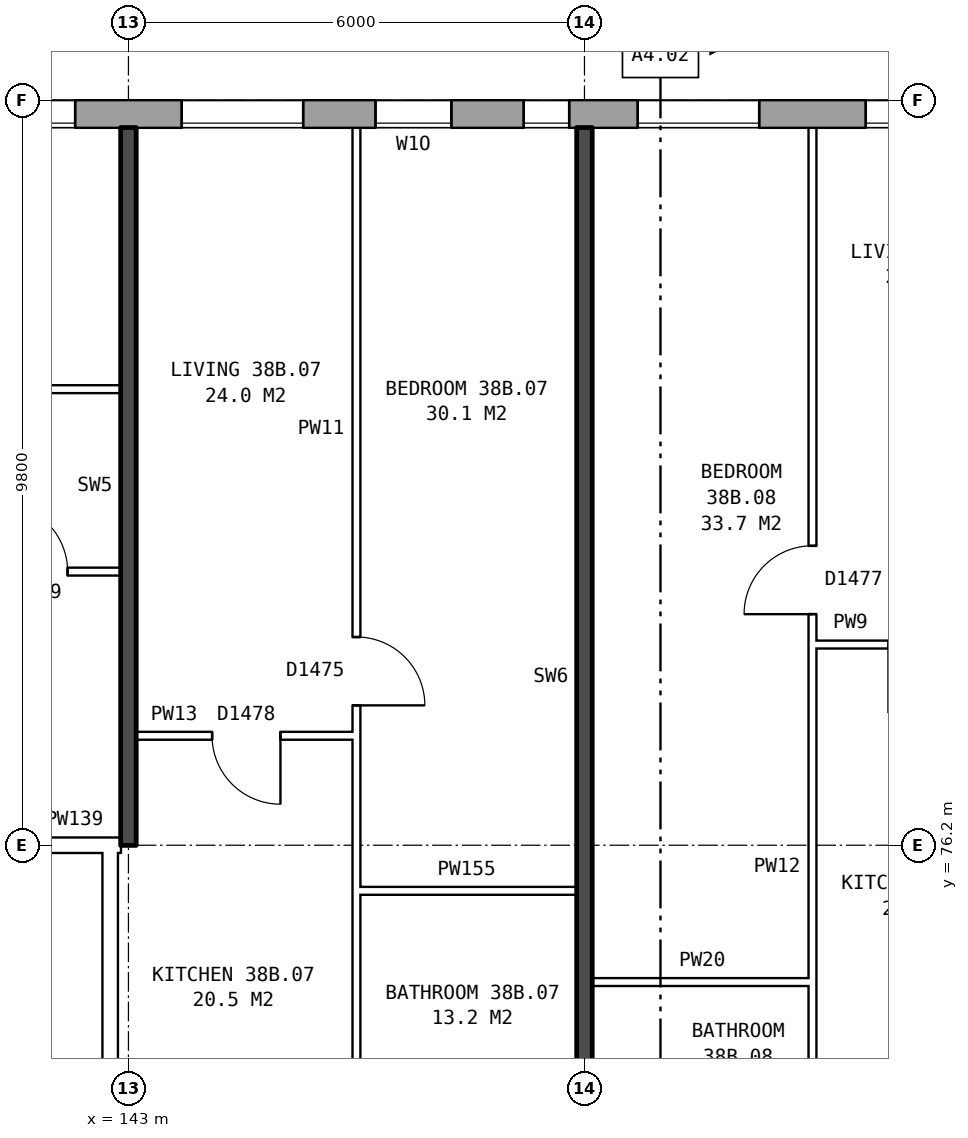
"""IFC4 building model, lengths in metres.
Left out: names, types, materials, properties, quantities, classifications, styles, units other than length and angle.
Written with IfcOpenShell. Run it as: python <this file> out.ifc"""

import sys

from ifc_helpers import new_model, si_unit, direction, frame, frame_2d, origin, place, context, subcontext, project, spatial, rectangle, extrude, element, fill, save


model = new_model("IFC4")
c1 = context("Model", 3, precision=1e-05, world=origin(), true_north=direction((0.0, 1.0)))
c2 = subcontext(c1, "Body", "Model", "MODEL_VIEW")
j1 = project(units=[si_unit("LENGTHUNIT", "METRE"), si_unit("PLANEANGLEUNIT", "RADIAN")], contexts=[c1])
p1 = place(None, origin())
s1 = spatial("IfcSite", under=j1, at=p1, CompositionType="ELEMENT")
p2 = place(p1, origin())
s2 = spatial("IfcBuilding", under=s1, at=p2, CompositionType="ELEMENT")
p3 = place(p2, frame((0.0, 0.0, 136.1)))
s3 = spatial("IfcBuildingStorey", under=s2, at=p3, CompositionType="ELEMENT", Elevation=136.1)
p4 = place(p3, frame((169.675, 85.82, 0.0), z_axis=(0.0, 0.0, 1.0), x_axis=(-1.0, 0.0, 0.0)))
e1 = element("IfcWall", 1, at=p4, inside=s3, PredefinedType="STANDARD", context=c2, shape_type="SweptSolid", body=[
    extrude(rectangle(XDim=35.601, YDim=0.36, at=frame_2d((17.8, 0.0))), origin(), (0.0, 0.0, 1.0), 2.85),
])
p5 = place(p4, frame((0.375, 0.0, 0.8)))
e2 = element("IfcOpeningElement", 2, at=p5, cuts=e1, PredefinedType="OPENING", context=c2, shape_type="SweptSolid", body=[
    extrude(rectangle(XDim=1.6, YDim=1.8, at=frame_2d((0.8, 0.9))), frame((0.0, 0.19, 0.0), z_axis=(0.0, -1.0, 0.0), x_axis=(1.0, 0.0, 0.0)), (0.0, 0.0, 1.0), 0.38),
])
p6 = place(p4, frame((3.375, 0.0, 0.8)))
e3 = element("IfcOpeningElement", 3, at=p6, cuts=e1, PredefinedType="OPENING", context=c2, shape_type="SweptSolid", body=[
    extrude(rectangle(XDim=1.6, YDim=1.8, at=frame_2d((0.8, 0.9))), frame((0.0, 0.19, 0.0), z_axis=(0.0, -1.0, 0.0), x_axis=(1.0, 0.0, 0.0)), (0.0, 0.0, 1.0), 0.38),
])
p7 = place(p4, frame((6.375, 0.0, 0.8)))
e4 = element("IfcOpeningElement", 4, at=p7, cuts=e1, PredefinedType="OPENING", context=c2, shape_type="SweptSolid", body=[
    extrude(rectangle(XDim=1.6, YDim=1.8, at=frame_2d((0.8, 0.9))), frame((0.0, 0.19, 0.0), z_axis=(0.0, -1.0, 0.0), x_axis=(1.0, 0.0, 0.0)), (0.0, 0.0, 1.0), 0.38),
])
p8 = place(p4, frame((9.375, 0.0, 0.8)))
e5 = element("IfcOpeningElement", 5, at=p8, cuts=e1, PredefinedType="OPENING", context=c2, shape_type="SweptSolid", body=[
    extrude(rectangle(XDim=1.6, YDim=1.8, at=frame_2d((0.8, 0.9))), frame((0.0, 0.19, 0.0), z_axis=(0.0, -1.0, 0.0), x_axis=(1.0, 0.0, 0.0)), (0.0, 0.0, 1.0), 0.38),
])
p9 = place(p4, frame((11.275, 0.0, 0.8)))
e6 = element("IfcOpeningElement", 6, at=p9, cuts=e1, PredefinedType="OPENING", context=c2, shape_type="SweptSolid", body=[
    extrude(rectangle(XDim=1.2, YDim=1.8, at=frame_2d((0.6, 0.9))), frame((0.0, 0.19, 0.0), z_axis=(0.0, -1.0, 0.0), x_axis=(1.0, 0.0, 0.0)), (0.0, 0.0, 1.0), 0.38),
])
p10 = place(p4, frame((15.375, 0.0, 0.8)))
e7 = element("IfcOpeningElement", 7, at=p10, cuts=e1, PredefinedType="OPENING", context=c2, shape_type="SweptSolid", body=[
    extrude(rectangle(XDim=1.6, YDim=1.8, at=frame_2d((0.8, 0.9))), frame((0.0, 0.19, 0.0), z_axis=(0.0, -1.0, 0.0), x_axis=(1.0, 0.0, 0.0)), (0.0, 0.0, 1.0), 0.38),
])
p11 = place(p4, frame((18.375, 0.0, 0.8)))
e8 = element("IfcOpeningElement", 8, at=p11, cuts=e1, PredefinedType="OPENING", context=c2, shape_type="SweptSolid", body=[
    extrude(rectangle(XDim=1.6, YDim=1.8, at=frame_2d((0.8, 0.9))), frame((0.0, 0.19, 0.0), z_axis=(0.0, -1.0, 0.0), x_axis=(1.0, 0.0, 0.0)), (0.0, 0.0, 1.0), 0.38),
])
p12 = place(p4, frame((20.875, 0.0, 0.35)))
e9 = element("IfcOpeningElement", 9, at=p12, cuts=e1, PredefinedType="OPENING", context=c2, shape_type="SweptSolid", body=[
    extrude(rectangle(XDim=0.6, YDim=0.9, at=frame_2d((0.3, 0.45))), frame((0.0, 0.19, 0.0), z_axis=(0.0, -1.0, 0.0), x_axis=(1.0, 0.0, 0.0)), (0.0, 0.0, 1.0), 0.38),
])
p13 = place(p4, frame((24.375, 0.0, 0.8)))
e10 = element("IfcOpeningElement", 10, at=p13, cuts=e1, PredefinedType="OPENING", context=c2, shape_type="SweptSolid", body=[
    extrude(rectangle(XDim=1.6, YDim=1.8, at=frame_2d((0.8, 0.9))), frame((0.0, 0.19, 0.0), z_axis=(0.0, -1.0, 0.0), x_axis=(1.0, 0.0, 0.0)), (0.0, 0.0, 1.0), 0.38),
])
p14 = place(p4, frame((27.375, 0.0, 0.8)))
e11 = element("IfcOpeningElement", 11, at=p14, cuts=e1, PredefinedType="OPENING", context=c2, shape_type="SweptSolid", body=[
    extrude(rectangle(XDim=1.6, YDim=1.8, at=frame_2d((0.8, 0.9))), frame((0.0, 0.19, 0.0), z_axis=(0.0, -1.0, 0.0), x_axis=(1.0, 0.0, 0.0)), (0.0, 0.0, 1.0), 0.38),
])
p15 = place(p4, frame((30.375, 0.0, 0.8)))
e12 = element("IfcOpeningElement", 12, at=p15, cuts=e1, PredefinedType="OPENING", context=c2, shape_type="SweptSolid", body=[
    extrude(rectangle(XDim=1.6, YDim=1.8, at=frame_2d((0.8, 0.9))), frame((0.0, 0.19, 0.0), z_axis=(0.0, -1.0, 0.0), x_axis=(1.0, 0.0, 0.0)), (0.0, 0.0, 1.0), 0.38),
])
p16 = place(p4, frame((33.375, 0.0, 0.8)))
e13 = element("IfcOpeningElement", 13, at=p16, cuts=e1, PredefinedType="OPENING", context=c2, shape_type="SweptSolid", body=[
    extrude(rectangle(XDim=1.6, YDim=1.8, at=frame_2d((0.8, 0.9))), frame((0.0, 0.19, 0.0), z_axis=(0.0, -1.0, 0.0), x_axis=(1.0, 0.0, 0.0)), (0.0, 0.0, 1.0), 0.38),
])
p17 = place(p4, frame((12.775, 0.0, 1.6)))
e14 = element("IfcOpeningElement", 14, at=p17, cuts=e1, PredefinedType="OPENING", context=c2, shape_type="SweptSolid", body=[
    extrude(rectangle(XDim=0.6, YDim=0.9, at=frame_2d((0.3, 0.45))), frame((0.0, 0.19, 0.0), z_axis=(0.0, -1.0, 0.0), x_axis=(1.0, 0.0, 0.0)), (0.0, 0.0, 1.0), 0.38),
])
p18 = place(p4, frame((22.425, 0.0, 1.35)))
e15 = element("IfcOpeningElement", 15, at=p18, cuts=e1, PredefinedType="OPENING", context=c2, shape_type="SweptSolid", body=[
    extrude(rectangle(XDim=1.0, YDim=1.2, at=frame_2d((0.5, 0.6))), frame((0.0, 0.19, 0.0), z_axis=(0.0, -1.0, 0.0), x_axis=(1.0, 0.0, 0.0)), (0.0, 0.0, 1.0), 0.38),
])
p19 = place(p3, frame((142.76, 63.9, 0.0), z_axis=(0.0, 0.0, 1.0), x_axis=(0.0, 1.0, 0.0)))
e16 = element("IfcWall", 16, at=p19, inside=s3, PredefinedType="PARTITIONING", context=c2, shape_type="SweptSolid", body=[
    extrude(rectangle(XDim=12.2, YDim=0.2, at=frame_2d((6.1, 0.0))), origin(), (0.0, 0.0, 1.0), 2.85),
])
p20 = place(p19, frame((5.1, 0.0, 0.0)))
e17 = element("IfcOpeningElement", 17, at=p20, cuts=e16, PredefinedType="OPENING", context=c2, shape_type="SweptSolid", body=[
    extrude(rectangle(XDim=2.0, YDim=2.1, at=frame_2d((1.0, 1.05))), frame((0.0, 0.11, 0.0), z_axis=(0.0, -1.0, 0.0), x_axis=(1.0, 0.0, 0.0)), (0.0, 0.0, 1.0), 0.22),
])
for number, where, z_axis, x_axis in (
    (18, (149.1, 74.4, 0.0), (0.0, 0.0, 1.0), (1.0, 0.0, 0.0)),
    (19, (146.0, 75.6, 0.0), (0.0, 0.0, 1.0), (1.0, 0.0, 0.0)),
):
    element("IfcWall", number, at=place(p3, frame(where, z_axis=z_axis, x_axis=x_axis)), inside=s3, PredefinedType="PARTITIONING", context=c2, shape_type="SweptSolid", body=[
        extrude(rectangle(XDim=2.9, YDim=0.1, at=frame_2d((1.45, 0.0))), origin(), (0.0, 0.0, 1.0), 2.85),
    ])
p21 = place(p3, frame((139.76, 76.2, 0.0), z_axis=(0.0, 0.0, 1.0), x_axis=(1.0, 0.0, 0.0)))
e20 = element("IfcWall", 20, at=p21, inside=s3, PredefinedType="PARTITIONING", context=c2, shape_type="SweptSolid", body=[
    extrude(rectangle(XDim=3.0, YDim=0.2, at=frame_2d((1.5, 0.0))), origin(), (0.0, 0.0, 1.0), 2.85),
])
p22 = place(p21, frame((1.0, 0.0, 0.0)))
e21 = element("IfcOpeningElement", 21, at=p22, cuts=e20, PredefinedType="OPENING", context=c2, shape_type="SweptSolid", body=[
    extrude(rectangle(XDim=1.0, YDim=2.1, at=frame_2d((0.5, 1.05))), frame((0.0, 0.11, 0.0), z_axis=(0.0, -1.0, 0.0), x_axis=(1.0, 0.0, 0.0)), (0.0, 0.0, 1.0), 0.22),
])
p23 = place(p3, frame((142.76, 76.2, 0.0), z_axis=(0.0, 0.0, 1.0), x_axis=(1.0, 0.0, 0.0)))
e22 = element("IfcWall", 22, at=p23, inside=s3, PredefinedType="PARTITIONING", context=c2, shape_type="SweptSolid", body=[
    extrude(rectangle(XDim=0.14, YDim=0.2, at=frame_2d((0.07, 0.0))), origin(), (0.0, 0.0, 1.0), 2.85),
])
p24 = place(p3, frame((143.1, 77.64, 0.0), z_axis=(0.0, 0.0, 1.0), x_axis=(1.0, 0.0, 0.0)))
e23 = element("IfcWall", 23, at=p24, inside=s3, PredefinedType="PARTITIONING", context=c2, shape_type="SweptSolid", body=[
    extrude(rectangle(XDim=2.9, YDim=0.1, at=frame_2d((1.45, 0.0))), origin(), (0.0, 0.0, 1.0), 2.85),
])
p25 = place(p24, frame((1.0, 0.0, 0.0)))
e24 = element("IfcOpeningElement", 24, at=p25, cuts=e23, PredefinedType="OPENING", context=c2, shape_type="SweptSolid", body=[
    extrude(rectangle(XDim=0.9, YDim=2.1, at=frame_2d((0.45, 1.05))), frame((0.0, 0.06, 0.0), z_axis=(0.0, -1.0, 0.0), x_axis=(1.0, 0.0, 0.0)), (0.0, 0.0, 1.0), 0.12),
])
p26 = place(p3, frame((152.0, 78.84, 0.0), z_axis=(0.0, 0.0, 1.0), x_axis=(1.0, 0.0, 0.0)))
e25 = element("IfcWall", 25, at=p26, inside=s3, PredefinedType="PARTITIONING", context=c2, shape_type="SweptSolid", body=[
    extrude(rectangle(XDim=2.9, YDim=0.1, at=frame_2d((1.45, 0.0))), origin(), (0.0, 0.0, 1.0), 2.85),
])
p27 = place(p26, frame((1.0, 0.0, 0.0)))
e26 = element("IfcOpeningElement", 26, at=p27, cuts=e25, PredefinedType="OPENING", context=c2, shape_type="SweptSolid", body=[
    extrude(rectangle(XDim=0.9, YDim=2.1, at=frame_2d((0.45, 1.05))), frame((0.0, 0.06, 0.0), z_axis=(0.0, -1.0, 0.0), x_axis=(1.0, 0.0, 0.0)), (0.0, 0.0, 1.0), 0.12),
])
p28 = place(p3, frame((137.1, 79.8, 0.0), z_axis=(0.0, 0.0, 1.0), x_axis=(1.0, 0.0, 0.0)))
e27 = element("IfcWall", 27, at=p28, inside=s3, PredefinedType="PARTITIONING", context=c2, shape_type="SweptSolid", body=[
    extrude(rectangle(XDim=5.8, YDim=0.1, at=frame_2d((2.9, 0.0))), origin(), (0.0, 0.0, 1.0), 2.85),
])
p29 = place(p28, frame((1.3, 0.0, 0.0)))
e28 = element("IfcOpeningElement", 28, at=p29, cuts=e27, PredefinedType="OPENING", context=c2, shape_type="SweptSolid", body=[
    extrude(rectangle(XDim=0.9, YDim=2.1, at=frame_2d((0.45, 1.05))), frame((0.0, 0.06, 0.0), z_axis=(0.0, -1.0, 0.0), x_axis=(1.0, 0.0, 0.0)), (0.0, 0.0, 1.0), 0.12),
])
p30 = place(p28, frame((4.2, 0.0, 0.0)))
e29 = element("IfcOpeningElement", 29, at=p30, cuts=e27, PredefinedType="OPENING", context=c2, shape_type="SweptSolid", body=[
    extrude(rectangle(XDim=0.9, YDim=2.1, at=frame_2d((0.45, 1.05))), frame((0.0, 0.06, 0.0), z_axis=(0.0, -1.0, 0.0), x_axis=(1.0, 0.0, 0.0)), (0.0, 0.0, 1.0), 0.12),
])
p31 = place(p3, frame((140.6, 82.2, 0.0), z_axis=(0.0, 0.0, 1.0), x_axis=(1.0, 0.0, 0.0)))
e30 = element("IfcWall", 30, at=p31, inside=s3, PredefinedType="PARTITIONING", context=c2, shape_type="SweptSolid", body=[
    extrude(rectangle(XDim=2.3, YDim=0.1, at=frame_2d((1.15, 0.0))), origin(), (0.0, 0.0, 1.0), 2.85),
])
p32 = place(p3, frame((143.0, 76.2, 0.0), z_axis=(0.0, 0.0, 1.0), x_axis=(0.0, 1.0, 0.0)))
e31 = element("IfcWall", 31, at=p32, inside=s3, PredefinedType="SOLIDWALL", context=c2, shape_type="SweptSolid", body=[
    extrude(rectangle(XDim=9.44, YDim=0.2, at=frame_2d((4.72, 0.0))), origin(), (0.0, 0.0, 1.0), 2.85),
])
p33 = place(p3, frame((146.0, 71.3, 0.0), z_axis=(0.0, 0.0, 1.0), x_axis=(0.0, 1.0, 0.0)))
e32 = element("IfcWall", 32, at=p33, inside=s3, PredefinedType="PARTITIONING", context=c2, shape_type="SweptSolid", body=[
    extrude(rectangle(XDim=14.34, YDim=0.1, at=frame_2d((7.17, 0.0))), origin(), (0.0, 0.0, 1.0), 2.85),
])
p34 = place(p33, frame((6.74, 0.0, 0.0)))
e33 = element("IfcOpeningElement", 33, at=p34, cuts=e32, PredefinedType="OPENING", context=c2, shape_type="SweptSolid", body=[
    extrude(rectangle(XDim=0.9, YDim=2.1, at=frame_2d((0.45, 1.05))), frame((0.0, 0.06, 0.0), z_axis=(0.0, -1.0, 0.0), x_axis=(1.0, 0.0, 0.0)), (0.0, 0.0, 1.0), 0.12),
])
p35 = place(p33, frame((0.4, 0.0, 0.0)))
e34 = element("IfcOpeningElement", 34, at=p35, cuts=e32, PredefinedType="OPENING", context=c2, shape_type="SweptSolid", body=[
    extrude(rectangle(XDim=0.9, YDim=2.1, at=frame_2d((0.45, 1.05))), frame((0.0, 0.06, 0.0), z_axis=(0.0, -1.0, 0.0), x_axis=(1.0, 0.0, 0.0)), (0.0, 0.0, 1.0), 0.12),
])
p36 = place(p3, frame((149.0, 71.2, 0.0), z_axis=(0.0, 0.0, 1.0), x_axis=(0.0, 1.0, 0.0)))
e35 = element("IfcWall", 35, at=p36, inside=s3, PredefinedType="SOLIDWALL", context=c2, shape_type="SweptSolid", body=[
    extrude(rectangle(XDim=14.44, YDim=0.2, at=frame_2d((7.22, 0.0))), origin(), (0.0, 0.0, 1.0), 2.85),
])
p37 = place(p3, frame((152.0, 71.3, 0.0), z_axis=(0.0, 0.0, 1.0), x_axis=(0.0, 1.0, 0.0)))
e36 = element("IfcWall", 36, at=p37, inside=s3, PredefinedType="PARTITIONING", context=c2, shape_type="SweptSolid", body=[
    extrude(rectangle(XDim=14.34, YDim=0.1, at=frame_2d((7.17, 0.0))), origin(), (0.0, 0.0, 1.0), 2.85),
])
p38 = place(p37, frame((7.94, 0.0, 0.0)))
e37 = element("IfcOpeningElement", 37, at=p38, cuts=e36, PredefinedType="OPENING", context=c2, shape_type="SweptSolid", body=[
    extrude(rectangle(XDim=0.9, YDim=2.1, at=frame_2d((0.45, 1.05))), frame((0.0, 0.06, 0.0), z_axis=(0.0, -1.0, 0.0), x_axis=(1.0, 0.0, 0.0)), (0.0, 0.0, 1.0), 0.12),
])
p39 = place(p37, frame((0.4, 0.0, 0.0)))
e38 = element("IfcOpeningElement", 38, at=p39, cuts=e36, PredefinedType="OPENING", context=c2, shape_type="SweptSolid", body=[
    extrude(rectangle(XDim=0.9, YDim=2.1, at=frame_2d((0.45, 1.05))), frame((0.0, 0.06, 0.0), z_axis=(0.0, -1.0, 0.0), x_axis=(1.0, 0.0, 0.0)), (0.0, 0.0, 1.0), 0.12),
])
p40 = place(p10, origin())
e39 = element("IfcWindow", 39, at=p40, inside=s3, PartitioningType="SINGLE_PANEL", PredefinedType="WINDOW", context=c2, shape_type="SweptSolid", body=[
    extrude(rectangle(XDim=1.6, YDim=1.8, at=frame_2d((0.8, 0.9))), frame((0.0, 0.15, 0.0), z_axis=(0.0, -1.0, 0.0), x_axis=(1.0, 0.0, 0.0)), (0.0, 0.0, 1.0), 0.06),
])
fill(e7, e39)
p41 = place(p11, origin())
e40 = element("IfcWindow", 40, at=p41, inside=s3, PartitioningType="SINGLE_PANEL", PredefinedType="WINDOW", context=c2, shape_type="SweptSolid", body=[
    extrude(rectangle(XDim=1.6, YDim=1.8, at=frame_2d((0.8, 0.9))), frame((0.0, 0.15, 0.0), z_axis=(0.0, -1.0, 0.0), x_axis=(1.0, 0.0, 0.0)), (0.0, 0.0, 1.0), 0.06),
])
fill(e8, e40)
p42 = place(p12, origin())
e41 = element("IfcWindow", 41, at=p42, inside=s3, PartitioningType="SINGLE_PANEL", PredefinedType="WINDOW", context=c2, shape_type="SweptSolid", body=[
    extrude(rectangle(XDim=0.6, YDim=0.9, at=frame_2d((0.3, 0.45))), frame((0.0, 0.15, 0.0), z_axis=(0.0, -1.0, 0.0), x_axis=(1.0, 0.0, 0.0)), (0.0, 0.0, 1.0), 0.06),
])
fill(e9, e41)
p43 = place(p13, origin())
e42 = element("IfcWindow", 42, at=p43, inside=s3, PartitioningType="SINGLE_PANEL", PredefinedType="WINDOW", context=c2, shape_type="SweptSolid", body=[
    extrude(rectangle(XDim=1.6, YDim=1.8, at=frame_2d((0.8, 0.9))), frame((0.0, 0.15, 0.0), z_axis=(0.0, -1.0, 0.0), x_axis=(1.0, 0.0, 0.0)), (0.0, 0.0, 1.0), 0.06),
])
fill(e10, e42)
p44 = place(p14, origin())
e43 = element("IfcWindow", 43, at=p44, inside=s3, PartitioningType="SINGLE_PANEL", PredefinedType="WINDOW", context=c2, shape_type="SweptSolid", body=[
    extrude(rectangle(XDim=1.6, YDim=1.8, at=frame_2d((0.8, 0.9))), frame((0.0, 0.15, 0.0), z_axis=(0.0, -1.0, 0.0), x_axis=(1.0, 0.0, 0.0)), (0.0, 0.0, 1.0), 0.06),
])
fill(e11, e43)
p45 = place(p30, origin())
e44 = element("IfcDoor", 44, at=p45, inside=s3, OperationType="SINGLE_SWING_LEFT", PredefinedType="DOOR", context=c2, shape_type="SweptSolid", body=[
    extrude(rectangle(XDim=0.9, YDim=2.1, at=frame_2d((0.45, 1.05))), frame((0.0, 0.025, 0.0), z_axis=(0.0, -1.0, 0.0), x_axis=(1.0, 0.0, 0.0)), (0.0, 0.0, 1.0), 0.05),
])
fill(e29, e44)
p46 = place(p34, frame((0.9, 0.0, 0.0), z_axis=(0.0, 0.0, 1.0), x_axis=(-1.0, 0.0, 0.0)))
e45 = element("IfcDoor", 45, at=p46, inside=s3, OperationType="SINGLE_SWING_RIGHT", PredefinedType="DOOR", context=c2, shape_type="SweptSolid", body=[
    extrude(rectangle(XDim=0.9, YDim=2.1, at=frame_2d((0.45, 1.05))), frame((0.0, 0.025, 0.0), z_axis=(0.0, -1.0, 0.0), x_axis=(1.0, 0.0, 0.0)), (0.0, 0.0, 1.0), 0.05),
])
fill(e33, e45)
p47 = place(p25, frame((0.9, 0.0, 0.0), z_axis=(0.0, 0.0, 1.0), x_axis=(-1.0, 0.0, 0.0)))
e46 = element("IfcDoor", 46, at=p47, inside=s3, OperationType="SINGLE_SWING_LEFT", PredefinedType="DOOR", context=c2, shape_type="SweptSolid", body=[
    extrude(rectangle(XDim=0.9, YDim=2.1, at=frame_2d((0.45, 1.05))), frame((0.0, 0.025, 0.0), z_axis=(0.0, -1.0, 0.0), x_axis=(1.0, 0.0, 0.0)), (0.0, 0.0, 1.0), 0.05),
])
fill(e24, e46)
p48 = place(p38, origin())
e47 = element("IfcDoor", 47, at=p48, inside=s3, OperationType="SINGLE_SWING_LEFT", PredefinedType="DOOR", context=c2, shape_type="SweptSolid", body=[
    extrude(rectangle(XDim=0.9, YDim=2.1, at=frame_2d((0.45, 1.05))), frame((0.0, 0.025, 0.0), z_axis=(0.0, -1.0, 0.0), x_axis=(1.0, 0.0, 0.0)), (0.0, 0.0, 1.0), 0.05),
])
fill(e37, e47)
p49 = place(p18, origin())
e48 = element("IfcWindow", 48, at=p49, inside=s3, PartitioningType="SINGLE_PANEL", PredefinedType="WINDOW", context=c2, shape_type="SweptSolid", body=[
    extrude(rectangle(XDim=1.0, YDim=1.2, at=frame_2d((0.5, 0.6))), frame((0.0, 0.15, 0.0), z_axis=(0.0, -1.0, 0.0), x_axis=(1.0, 0.0, 0.0)), (0.0, 0.0, 1.0), 0.06),
])
fill(e15, e48)
save(model, sys.argv[1])
